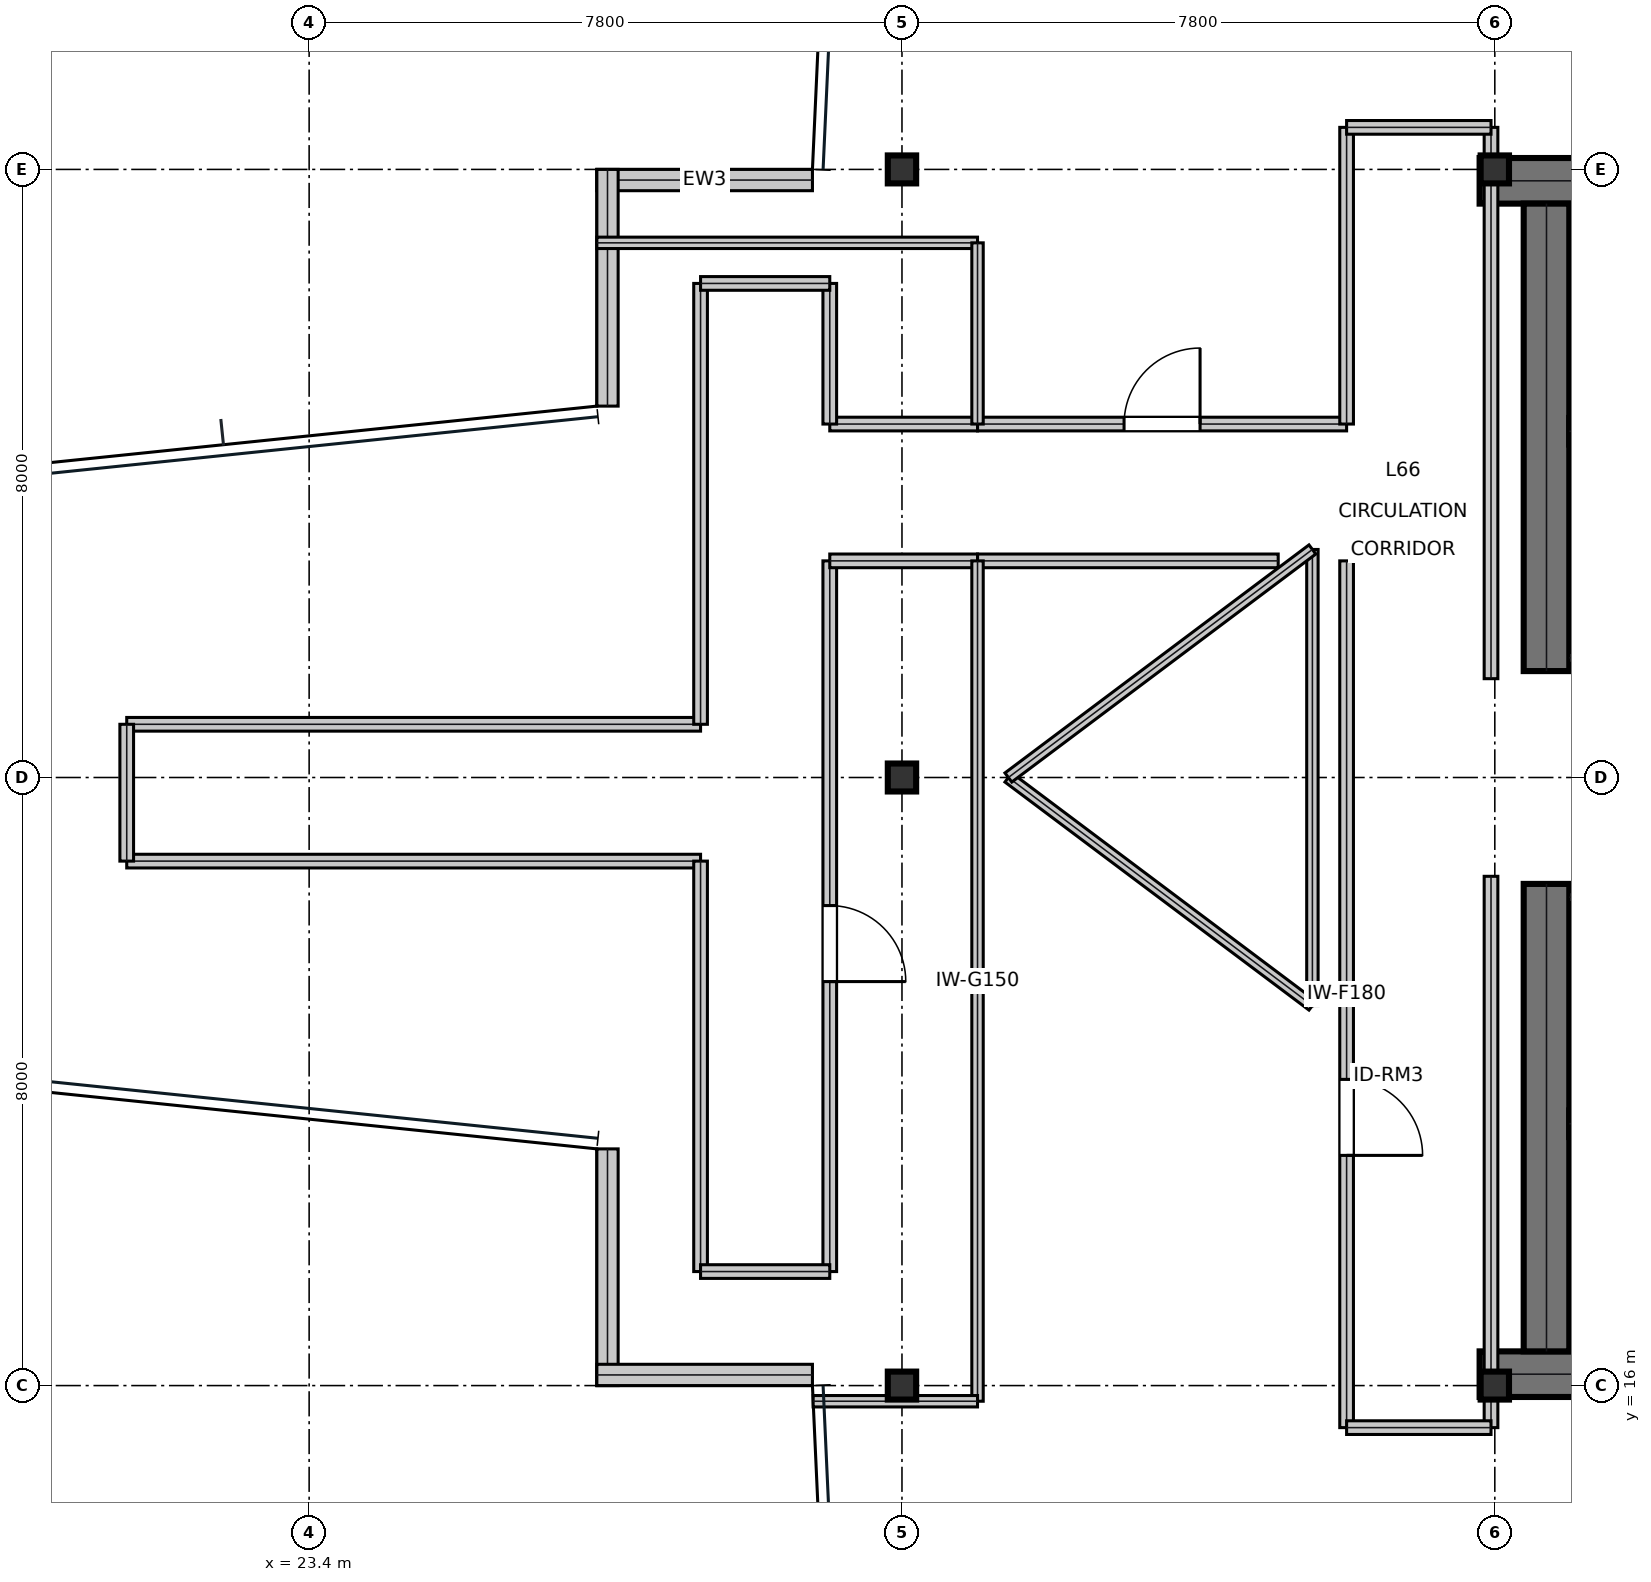
"""IFC4 building model, lengths in metres.
Left out: names, types, materials, properties, quantities, classifications, styles, units other than length and angle.
Written with IfcOpenShell. Run it as: python <this file> out.ifc"""

import sys

from ifc_helpers import new_model, si_unit, direction, frame, frame_2d, origin, origin_2d, place, context, subcontext, project, spatial, rectangle, i_section, extrude, element, fill, save


model = new_model("IFC4")
c1 = context("Model", 3, precision=1e-05, world=origin(), true_north=direction((0.0, 1.0)))
c2 = subcontext(c1, "Body", "Model", "MODEL_VIEW")
j1 = project(units=[si_unit("LENGTHUNIT", "METRE"), si_unit("PLANEANGLEUNIT", "RADIAN")], contexts=[c1])
p1 = place(None, origin())
s1 = spatial("IfcSite", under=j1, at=p1, CompositionType="ELEMENT")
p2 = place(p1, origin())
s2 = spatial("IfcBuilding", under=s1, at=p2, CompositionType="ELEMENT")
p3 = place(p2, frame((0.0, 0.0, 283.05)))
s3 = spatial("IfcBuildingStorey", under=s2, at=p3, CompositionType="ELEMENT", Elevation=283.05)
for number, where, z_axis, x_axis in (
    (1, (38.8, 31.85, 0.0), (0.0, 0.0, 1.0), (1.0, 0.0, 0.0)),
    (2, (38.8, 16.15, 0.0), (0.0, 0.0, 1.0), (1.0, 0.0, 0.0)),
):
    element("IfcWall", number, at=place(p3, frame(where, z_axis=z_axis, x_axis=x_axis)), inside=s3, PredefinedType="SHEAR", context=c2, shape_type="SweptSolid", body=[
        extrude(rectangle(XDim=16.0, YDim=0.6, at=frame_2d((8.0, 0.0))), origin(), (0.0, 0.0, 1.0), 3.81),
    ])
for number, where, z_axis, x_axis in (
    (3, (39.68, 16.45, 0.0), (0.0, 0.0, 1.0), (0.0, 1.0, 0.0)),
    (4, (39.68, 25.4, 0.0), (0.0, 0.0, 1.0), (0.0, 1.0, 0.0)),
):
    element("IfcWall", number, at=place(p3, frame(where, z_axis=z_axis, x_axis=x_axis)), inside=s3, PredefinedType="SHEAR", context=c2, shape_type="SweptSolid", body=[
        extrude(rectangle(XDim=6.15, YDim=0.6, at=frame_2d((3.075, 0.0))), origin(), (0.0, 0.0, 1.0), 3.81),
    ])
p4 = place(p3, frame((39.98, 28.555, 0.0), z_axis=(0.0, 0.0, 1.0), x_axis=(1.0, 0.0, 0.0)))
e5 = element("IfcWall", 5, at=p4, inside=s3, PredefinedType="SHEAR", context=c2, shape_type="SweptSolid", body=[
    extrude(rectangle(XDim=7.71, YDim=0.35, at=frame_2d((3.855, 0.0))), origin(), (0.0, 0.0, 1.0), 3.81),
])
p5 = place(p4, frame((0.25, 0.0, 0.0)))
e6 = element("IfcOpeningElement", 6, at=p5, cuts=e5, PredefinedType="OPENING", context=c2, shape_type="SweptSolid", body=[
    extrude(rectangle(XDim=1.1, YDim=2.15, at=frame_2d((0.55, 1.075))), frame((0.0, 0.185, 0.0), z_axis=(0.0, -1.0, 0.0), x_axis=(1.0, 0.0, 0.0)), (0.0, 0.0, 1.0), 0.37),
])
p6 = place(p3, frame((39.98, 19.445, 0.0), z_axis=(0.0, 0.0, 1.0), x_axis=(1.0, 0.0, 0.0)))
e7 = element("IfcWall", 7, at=p6, inside=s3, PredefinedType="SHEAR", context=c2, shape_type="SweptSolid", body=[
    extrude(rectangle(XDim=7.71, YDim=0.35, at=frame_2d((3.855, 0.0))), origin(), (0.0, 0.0, 1.0), 3.81),
])
p7 = place(p6, frame((0.25, 0.0, 0.0)))
e8 = element("IfcOpeningElement", 8, at=p7, cuts=e7, PredefinedType="OPENING", context=c2, shape_type="SweptSolid", body=[
    extrude(rectangle(XDim=1.1, YDim=2.15, at=frame_2d((0.55, 1.075))), frame((0.0, 0.185, 0.0), z_axis=(0.0, -1.0, 0.0), x_axis=(1.0, 0.0, 0.0)), (0.0, 0.0, 1.0), 0.37),
])
for number, where, z_axis, x_axis in (
    (9, (31.2, 16.0, 0.0), (0.0, 0.0, 1.0), (1.0, 0.0, 0.0)),
    (10, (31.2, 24.0, 0.0), (0.0, 0.0, 1.0), (1.0, 0.0, 0.0)),
    (11, (31.2, 32.0, 0.0), (0.0, 0.0, 1.0), (1.0, 0.0, 0.0)),
    (12, (39.0, 16.0, 0.0), (0.0, 0.0, 1.0), (1.0, 0.0, 0.0)),
    (13, (39.0, 32.0, 0.0), (0.0, 0.0, 1.0), (1.0, 0.0, 0.0)),
):
    element("IfcColumn", number, at=place(p3, frame(where, z_axis=z_axis, x_axis=x_axis)), inside=s3, PredefinedType="COLUMN", context=c2, shape_type="SweptSolid", body=[
        extrude(i_section(OverallWidth=0.373, OverallDepth=0.368, WebThickness=0.015, FlangeThickness=0.024, at=origin_2d()), origin(), (0.0, 0.0, 1.0), 4.044),
    ])
p8 = place(p3, frame((30.022, 31.86, 0.0), z_axis=(0.0, 0.0, 1.0), x_axis=(-1.0, 0.0, 0.0)))
e14 = element("IfcWall", 14, at=p8, inside=s3, PredefinedType="STANDARD", context=c2, shape_type="SweptSolid", body=[
    extrude(rectangle(XDim=2.836, YDim=0.28, at=frame_2d((1.418, 0.0))), origin(), (0.0, 0.0, 1.0), 3.81),
])
for number, where, z_axis, x_axis in (
    (15, (27.326, 32.0, 0.0), (0.0, 0.0, 1.0), (0.0, -1.0, 0.0)),
    (16, (27.326, 19.114, 0.0), (0.0, 0.0, 1.0), (0.0, -1.0, 0.0)),
):
    element("IfcWall", number, at=place(p3, frame(where, z_axis=z_axis, x_axis=x_axis)), inside=s3, PredefinedType="STANDARD", context=c2, shape_type="SweptSolid", body=[
        extrude(rectangle(XDim=3.114, YDim=0.28, at=frame_2d((1.557, 0.0))), origin(), (0.0, 0.0, 1.0), 3.339),
    ])
p9 = place(p3, frame((27.186, 16.14, 0.0), z_axis=(0.0, 0.0, 1.0), x_axis=(1.0, 0.0, 0.0)))
e17 = element("IfcWall", 17, at=p9, inside=s3, PredefinedType="STANDARD", context=c2, shape_type="SweptSolid", body=[
    extrude(rectangle(XDim=2.836, YDim=0.28, at=frame_2d((1.418, 0.0))), origin(), (0.0, 0.0, 1.0), 3.81),
])
p10 = place(p3, frame((39.98, 25.575, 0.0), z_axis=(0.0, 0.0, 1.0), x_axis=(1.0, 0.0, 0.0)))
e18 = element("IfcWall", 18, at=p10, inside=s3, PredefinedType="PARTITIONING", context=c2, shape_type="SweptSolid", body=[
    extrude(rectangle(XDim=5.9, YDim=0.15, at=frame_2d((2.95, 0.0))), origin(), (0.0, 0.0, 1.0), 3.81),
])
p11 = place(p10, frame((2.35, 0.0, 0.0)))
e19 = element("IfcOpeningElement", 19, at=p11, cuts=e18, PredefinedType="OPENING", context=c2, shape_type="SweptSolid", body=[
    extrude(rectangle(XDim=1.05, YDim=2.15, at=frame_2d((0.525, 1.075))), frame((0.0, 0.085, 0.0), z_axis=(0.0, -1.0, 0.0), x_axis=(1.0, 0.0, 0.0)), (0.0, 0.0, 1.0), 0.17),
])
p12 = place(p3, frame((39.98, 22.425, 0.0), z_axis=(0.0, 0.0, 1.0), x_axis=(1.0, 0.0, 0.0)))
e20 = element("IfcWall", 20, at=p12, inside=s3, PredefinedType="PARTITIONING", context=c2, shape_type="SweptSolid", body=[
    extrude(rectangle(XDim=5.9, YDim=0.15, at=frame_2d((2.95, 0.0))), origin(), (0.0, 0.0, 1.0), 3.81),
])
p13 = place(p12, frame((2.35, 0.0, 0.0)))
e21 = element("IfcOpeningElement", 21, at=p13, cuts=e20, PredefinedType="OPENING", context=c2, shape_type="SweptSolid", body=[
    extrude(rectangle(XDim=1.05, YDim=2.15, at=frame_2d((0.525, 1.075))), frame((0.0, 0.085, 0.0), z_axis=(0.0, -1.0, 0.0), x_axis=(1.0, 0.0, 0.0)), (0.0, 0.0, 1.0), 0.17),
])
p14 = place(p3, frame((37.05, 15.447, 0.0), z_axis=(0.0, 0.0, 1.0), x_axis=(0.0, 1.0, 0.0)))
e22 = element("IfcWall", 22, at=p14, inside=s3, PredefinedType="SOLIDWALL", context=c2, shape_type="SweptSolid", body=[
    extrude(rectangle(XDim=11.403, YDim=0.18, at=frame_2d((5.702, 0.0))), origin(), (0.0, 0.0, 1.0), 3.27),
])
p15 = place(p14, frame((3.582, 0.0, 0.0)))
e23 = element("IfcOpeningElement", 23, at=p15, cuts=e22, PredefinedType="OPENING", context=c2, shape_type="SweptSolid", body=[
    extrude(rectangle(XDim=1.0, YDim=2.15, at=frame_2d((0.5, 1.075))), frame((0.0, 0.1, 0.0), z_axis=(0.0, -1.0, 0.0), x_axis=(1.0, 0.0, 0.0)), (0.0, 0.0, 1.0), 0.2),
])
p16 = place(p3, frame((30.25, 17.5, 0.0), z_axis=(0.0, 0.0, 1.0), x_axis=(0.0, 1.0, 0.0)))
e24 = element("IfcWall", 24, at=p16, inside=s3, PredefinedType="SOLIDWALL", context=c2, shape_type="SweptSolid", body=[
    extrude(rectangle(XDim=9.35, YDim=0.18, at=frame_2d((4.675, 0.0))), origin(), (0.0, 0.0, 1.0), 3.27),
])
p17 = place(p16, frame((3.815, 0.0, 0.0)))
e25 = element("IfcOpeningElement", 25, at=p17, cuts=e24, PredefinedType="OPENING", context=c2, shape_type="SweptSolid", body=[
    extrude(rectangle(XDim=1.0, YDim=2.15, at=frame_2d((0.5, 1.075))), frame((0.0, 0.1, 0.0), z_axis=(0.0, -1.0, 0.0), x_axis=(1.0, 0.0, 0.0)), (0.0, 0.0, 1.0), 0.2),
])
p18 = place(p3, frame((32.194, 28.65, 0.0), z_axis=(0.0, 0.0, 1.0), x_axis=(1.0, 0.0, 0.0)))
e26 = element("IfcWall", 26, at=p18, inside=s3, PredefinedType="SOLIDWALL", context=c2, shape_type="SweptSolid", body=[
    extrude(rectangle(XDim=4.856, YDim=0.18, at=frame_2d((2.428, 0.0))), origin(), (0.0, 0.0, 1.0), 3.81),
])
p19 = place(p18, frame((1.928, 0.0, 0.0)))
e27 = element("IfcOpeningElement", 27, at=p19, cuts=e26, PredefinedType="OPENING", context=c2, shape_type="SweptSolid", body=[
    extrude(rectangle(XDim=1.0, YDim=2.15, at=frame_2d((0.5, 1.075))), frame((0.0, 0.1, 0.0), z_axis=(0.0, -1.0, 0.0), x_axis=(1.0, 0.0, 0.0)), (0.0, 0.0, 1.0), 0.2),
])
p20 = place(p3, frame((38.95, 15.447, 0.0), z_axis=(0.0, 0.0, 1.0), x_axis=(0.0, 1.0, 0.0)))
e28 = element("IfcWall", 28, at=p20, inside=s3, PredefinedType="SOLIDWALL", context=c2, shape_type="SweptSolid", body=[
    extrude(rectangle(XDim=7.253, YDim=0.18, at=frame_2d((3.626, 0.0))), origin(), (0.0, 0.0, 1.0), 3.27),
])
p21 = place(p3, frame((32.194, 26.85, 0.0), z_axis=(0.0, 0.0, 1.0), x_axis=(1.0, 0.0, 0.0)))
e29 = element("IfcWall", 29, at=p21, inside=s3, PredefinedType="SOLIDWALL", context=c2, shape_type="SweptSolid", body=[
    extrude(rectangle(XDim=3.956, YDim=0.18, at=frame_2d((1.978, 0.0))), origin(), (0.0, 0.0, 1.0), 3.81),
])
p22 = place(p3, frame((37.05, 15.447, 0.0), z_axis=(0.0, 0.0, 1.0), x_axis=(1.0, 0.0, 0.0)))
e30 = element("IfcWall", 30, at=p22, inside=s3, PredefinedType="SOLIDWALL", context=c2, shape_type="SweptSolid", body=[
    extrude(rectangle(XDim=1.9, YDim=0.18, at=frame_2d((0.95, 0.0))), origin(), (0.0, 0.0, 1.0), 3.27),
])
for number, where, z_axis, x_axis in (
    (31, (21.0, 22.9, 0.0), (0.0, 0.0, 1.0), (1.0, 0.0, 0.0)),
    (32, (21.0, 24.7, 0.0), (0.0, 0.0, 1.0), (1.0, 0.0, 0.0)),
):
    element("IfcWall", number, at=place(p3, frame(where, z_axis=z_axis, x_axis=x_axis)), inside=s3, PredefinedType="SOLIDWALL", context=c2, shape_type="SweptSolid", body=[
        extrude(rectangle(XDim=7.55, YDim=0.18, at=frame_2d((3.775, 0.0))), origin(), (0.0, 0.0, 1.0), 3.27),
    ])
p23 = place(p3, frame((28.55, 24.7, 0.0), z_axis=(0.0, 0.0, 1.0), x_axis=(0.0, 1.0, 0.0)))
e33 = element("IfcWall", 33, at=p23, inside=s3, PredefinedType="SOLIDWALL", context=c2, shape_type="SweptSolid", body=[
    extrude(rectangle(XDim=5.8, YDim=0.18, at=frame_2d((2.9, 0.0))), origin(), (0.0, 0.0, 1.0), 3.81),
])
p24 = place(p3, frame((28.55, 17.5, 0.0), z_axis=(0.0, 0.0, 1.0), x_axis=(0.0, 1.0, 0.0)))
e34 = element("IfcWall", 34, at=p24, inside=s3, PredefinedType="SOLIDWALL", context=c2, shape_type="SweptSolid", body=[
    extrude(rectangle(XDim=5.4, YDim=0.18, at=frame_2d((2.7, 0.0))), origin(), (0.0, 0.0, 1.0), 3.81),
])
for number, where, z_axis, x_axis in (
    (35, (30.25, 26.85, 0.0), (0.0, 0.0, 1.0), (1.0, 0.0, 0.0)),
    (36, (30.25, 28.65, 0.0), (0.0, 0.0, 1.0), (1.0, 0.0, 0.0)),
):
    element("IfcWall", number, at=place(p3, frame(where, z_axis=z_axis, x_axis=x_axis)), inside=s3, PredefinedType="SOLIDWALL", context=c2, shape_type="SweptSolid", body=[
        extrude(rectangle(XDim=1.944, YDim=0.18, at=frame_2d((0.972, 0.0))), origin(), (0.0, 0.0, 1.0), 3.27),
    ])
p25 = place(p3, frame((30.25, 28.65, 0.0), z_axis=(0.0, 0.0, 1.0), x_axis=(0.0, 1.0, 0.0)))
e37 = element("IfcWall", 37, at=p25, inside=s3, PredefinedType="SOLIDWALL", context=c2, shape_type="SweptSolid", body=[
    extrude(rectangle(XDim=1.85, YDim=0.18, at=frame_2d((0.925, 0.0))), origin(), (0.0, 0.0, 1.0), 3.81),
])
p26 = place(p3, frame((21.0, 22.9, 0.0), z_axis=(0.0, 0.0, 1.0), x_axis=(0.0, 1.0, 0.0)))
e38 = element("IfcWall", 38, at=p26, inside=s3, PredefinedType="SOLIDWALL", context=c2, shape_type="SweptSolid", body=[
    extrude(rectangle(XDim=1.8, YDim=0.18, at=frame_2d((0.9, 0.0))), origin(), (0.0, 0.0, 1.0), 3.81),
])
for number, where, z_axis, x_axis in (
    (39, (28.55, 17.5, 0.0), (0.0, 0.0, 1.0), (1.0, 0.0, 0.0)),
    (40, (28.55, 30.5, 0.0), (0.0, 0.0, 1.0), (1.0, 0.0, 0.0)),
):
    element("IfcWall", number, at=place(p3, frame(where, z_axis=z_axis, x_axis=x_axis)), inside=s3, PredefinedType="SOLIDWALL", context=c2, shape_type="SweptSolid", body=[
        extrude(rectangle(XDim=1.7, YDim=0.18, at=frame_2d((0.85, 0.0))), origin(), (0.0, 0.0, 1.0), 3.81),
    ])
p27 = place(p3, frame((38.95, 25.3, 0.0), z_axis=(0.0, 0.0, 1.0), x_axis=(0.0, 1.0, 0.0)))
e41 = element("IfcWall", 41, at=p27, inside=s3, PredefinedType="SOLIDWALL", context=c2, shape_type="SweptSolid", body=[
    extrude(rectangle(XDim=7.253, YDim=0.18, at=frame_2d((3.626, 0.0))), origin(), (0.0, 0.0, 1.0), 3.27),
])
p28 = place(p3, frame((37.05, 28.65, 0.0), z_axis=(0.0, 0.0, 1.0), x_axis=(0.0, 1.0, 0.0)))
e42 = element("IfcWall", 42, at=p28, inside=s3, PredefinedType="SOLIDWALL", context=c2, shape_type="SweptSolid", body=[
    extrude(rectangle(XDim=3.903, YDim=0.18, at=frame_2d((1.952, 0.0))), origin(), (0.0, 0.0, 1.0), 3.27),
])
p29 = place(p3, frame((37.05, 32.553, 0.0), z_axis=(0.0, 0.0, 1.0), x_axis=(1.0, 0.0, 0.0)))
e43 = element("IfcWall", 43, at=p29, inside=s3, PredefinedType="SOLIDWALL", context=c2, shape_type="SweptSolid", body=[
    extrude(rectangle(XDim=1.9, YDim=0.18, at=frame_2d((0.95, 0.0))), origin(), (0.0, 0.0, 1.0), 3.27),
])
p30 = place(p3, frame((32.194, 15.794, 0.0), z_axis=(0.0, 0.0, 1.0), x_axis=(0.0, 1.0, 0.0)))
e44 = element("IfcWall", 44, at=p30, inside=s3, PredefinedType="MOVABLE", context=c2, shape_type="SweptSolid", body=[
    extrude(rectangle(XDim=11.056, YDim=0.15, at=frame_2d((5.528, 0.0))), origin(), (0.0, 0.0, 1.0), 3.27),
])
p31 = place(p3, frame((30.031, 15.794, 0.0), z_axis=(0.0, 0.0, 1.0), x_axis=(1.0, 0.0, 0.0)))
e45 = element("IfcWall", 45, at=p31, inside=s3, PredefinedType="MOVABLE", context=c2, shape_type="SweptSolid", body=[
    extrude(rectangle(XDim=2.163, YDim=0.15, at=frame_2d((1.081, 0.0))), origin(), (0.0, 0.0, 1.0), 3.27),
])
p32 = place(p3, frame((27.186, 31.034, 0.0), z_axis=(0.0, 0.0, 1.0), x_axis=(1.0, 0.0, 0.0)))
e46 = element("IfcWall", 46, at=p32, inside=s3, PredefinedType="MOVABLE", context=c2, shape_type="SweptSolid", body=[
    extrude(rectangle(XDim=5.009, YDim=0.15, at=frame_2d((2.504, 0.0))), origin(), (0.0, 0.0, 1.0), 3.27),
])
p33 = place(p3, frame((32.194, 28.65, 0.0), z_axis=(0.0, 0.0, 1.0), x_axis=(0.0, 1.0, 0.0)))
e47 = element("IfcWall", 47, at=p33, inside=s3, PredefinedType="MOVABLE", context=c2, shape_type="SweptSolid", body=[
    extrude(rectangle(XDim=2.384, YDim=0.15, at=frame_2d((1.192, 0.0))), origin(), (0.0, 0.0, 1.0), 3.54),
])
p34 = place(p3, frame((32.6, 24.0, 0.0), z_axis=(0.0, 0.0, 1.0), x_axis=(0.8, -0.6, 0.0)))
e48 = element("IfcWall", 48, at=p34, inside=s3, PredefinedType="MOVABLE", context=c2, shape_type="SweptSolid", body=[
    extrude(rectangle(XDim=5.0, YDim=0.15, at=frame_2d((2.5, 0.0))), origin(), (0.0, 0.0, 1.0), 3.81),
])
p35 = place(p3, frame((36.6, 21.0, 0.0), z_axis=(0.0, 0.0, 1.0), x_axis=(0.0, 1.0, 0.0)))
e49 = element("IfcWall", 49, at=p35, inside=s3, PredefinedType="MOVABLE", context=c2, shape_type="SweptSolid", body=[
    extrude(rectangle(XDim=6.0, YDim=0.15, at=frame_2d((3.0, 0.0))), origin(), (0.0, 0.0, 1.0), 3.81),
])
p36 = place(p3, frame((36.6, 27.0, 0.0), z_axis=(0.0, 0.0, 1.0), x_axis=(-0.8, -0.6, 0.0)))
e50 = element("IfcWall", 50, at=p36, inside=s3, PredefinedType="MOVABLE", context=c2, shape_type="SweptSolid", body=[
    extrude(rectangle(XDim=5.0, YDim=0.15, at=frame_2d((2.5, 0.0))), origin(), (0.0, 0.0, 1.0), 3.81),
])
p37 = place(p15, frame((1.0, 0.0, 0.0), z_axis=(0.0, 0.0, 1.0), x_axis=(-1.0, 0.0, 0.0)))
e51 = element("IfcDoor", 51, at=p37, inside=s3, OperationType="SINGLE_SWING_RIGHT", PredefinedType="DOOR", context=c2, shape_type="SweptSolid", body=[
    extrude(rectangle(XDim=1.0, YDim=2.15, at=frame_2d((0.5, 1.075))), frame((0.0, 0.025, 0.0), z_axis=(0.0, -1.0, 0.0), x_axis=(1.0, 0.0, 0.0)), (0.0, 0.0, 1.0), 0.05),
])
fill(e23, e51)
p38 = place(p17, frame((1.0, 0.0, 0.0), z_axis=(0.0, 0.0, 1.0), x_axis=(-1.0, 0.0, 0.0)))
e52 = element("IfcDoor", 52, at=p38, inside=s3, OperationType="SINGLE_SWING_RIGHT", PredefinedType="DOOR", context=c2, shape_type="SweptSolid", body=[
    extrude(rectangle(XDim=1.0, YDim=2.15, at=frame_2d((0.5, 1.075))), frame((0.0, 0.025, 0.0), z_axis=(0.0, -1.0, 0.0), x_axis=(1.0, 0.0, 0.0)), (0.0, 0.0, 1.0), 0.05),
])
fill(e25, e52)
p39 = place(p19, origin())
e53 = element("IfcDoor", 53, at=p39, inside=s3, OperationType="SINGLE_SWING_RIGHT", PredefinedType="DOOR", context=c2, shape_type="SweptSolid", body=[
    extrude(rectangle(XDim=1.0, YDim=2.15, at=frame_2d((0.5, 1.075))), frame((0.0, 0.025, 0.0), z_axis=(0.0, -1.0, 0.0), x_axis=(1.0, 0.0, 0.0)), (0.0, 0.0, 1.0), 0.05),
])
fill(e27, e53)
save(model, sys.argv[1])
